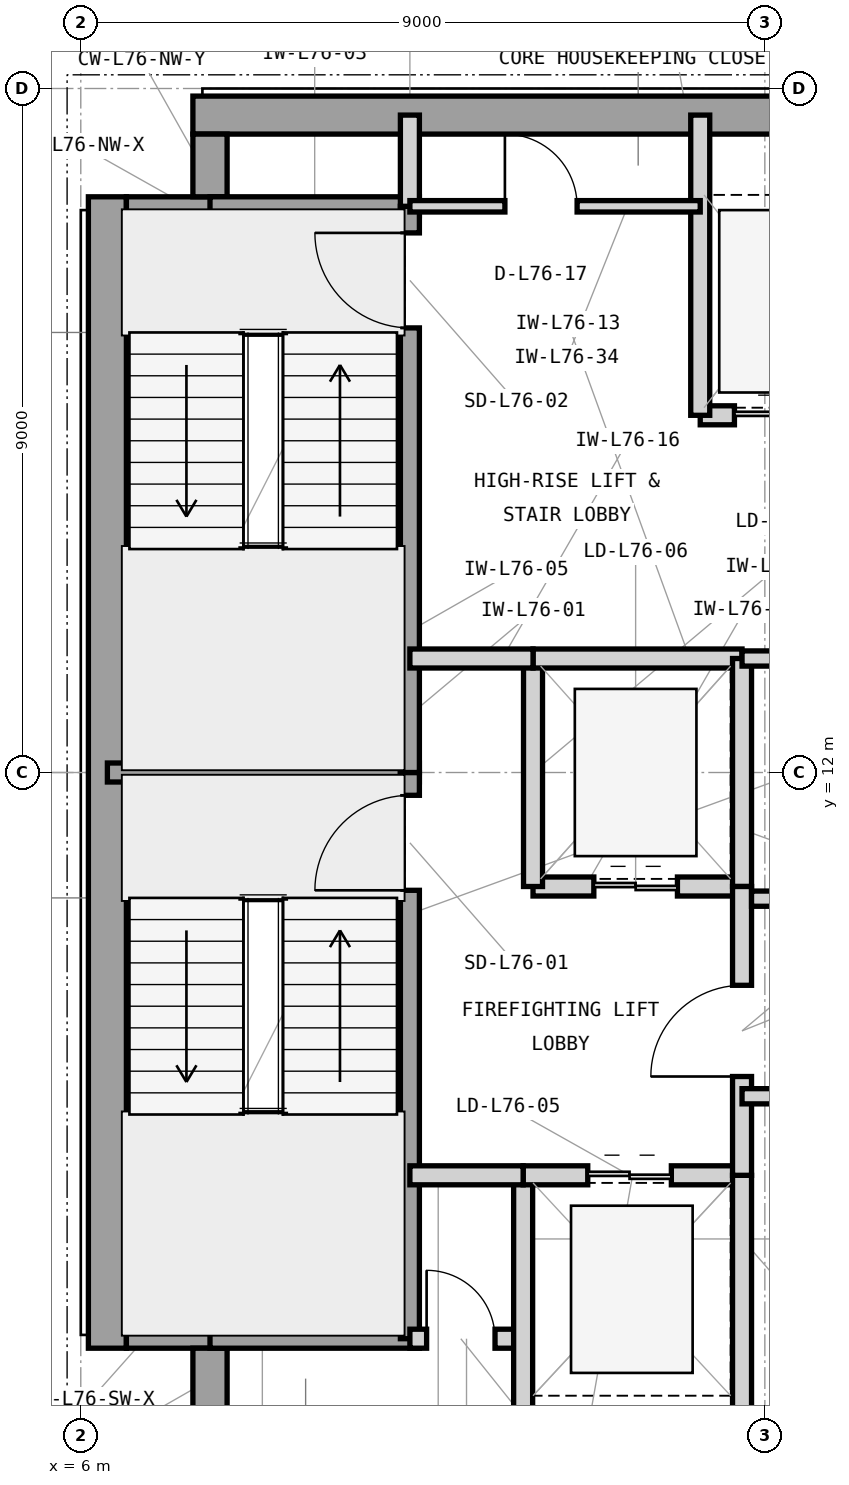
"""IFC4 building model, lengths in metres.
Left out: names, types, materials, properties, quantities, classifications, styles, units other than length and angle.
Written with IfcOpenShell. Run it as: python <this file> out.ifc"""

import sys

from ifc_helpers import new_model, si_unit, direction, frame, frame_2d, origin, place, context, subcontext, project, spatial, rectangle, extrude, element, fill, save


model = new_model("IFC4")
c1 = context("Model", 3, precision=1e-05, world=origin(), true_north=direction((0.0, 1.0)))
c2 = subcontext(c1, "Body", "Model", "MODEL_VIEW")
j1 = project(units=[si_unit("LENGTHUNIT", "METRE"), si_unit("PLANEANGLEUNIT", "RADIAN")], contexts=[c1])
p1 = place(None, origin())
s1 = spatial("IfcSite", under=j1, at=p1, CompositionType="ELEMENT")
p2 = place(p1, origin())
s2 = spatial("IfcBuilding", under=s1, at=p2, CompositionType="ELEMENT")
p3 = place(p2, frame((0.0, 0.0, 309.3)))
s3 = spatial("IfcBuildingStorey", under=s2, at=p3, CompositionType="ELEMENT", Elevation=309.3)
p4 = place(p3, frame((6.35, 4.425, 0.0), z_axis=(0.0, 0.0, 1.0), x_axis=(0.0, 1.0, 0.0)))
e1 = element("IfcWall", 1, at=p4, inside=s3, PredefinedType="SHEAR", context=c2, shape_type="SweptSolid", body=[
    extrude(rectangle(XDim=15.15, YDim=0.5, at=frame_2d((7.575, 0.0))), origin(), (0.0, 0.0, 1.0), 3.9),
])
p5 = place(p3, frame((7.475, 20.65, 0.0), z_axis=(0.0, 0.0, 1.0), x_axis=(1.0, 0.0, 0.0)))
e2 = element("IfcWall", 2, at=p5, inside=s3, PredefinedType="SHEAR", context=c2, shape_type="SweptSolid", body=[
    extrude(rectangle(XDim=12.325, YDim=0.5, at=frame_2d((6.163, 0.0))), origin(), (0.0, 0.0, 1.0), 3.9),
])
p6 = place(p3, frame((6.6, 4.65, 0.0), z_axis=(0.0, 0.0, 1.0), x_axis=(1.0, 0.0, 0.0)))
e3 = element("IfcWall", 3, at=p6, inside=s3, PredefinedType="SHEAR", context=c2, shape_type="SweptSolid", body=[
    extrude(rectangle(XDim=1.325, YDim=0.45, at=frame_2d((0.663, 0.0))), origin(), (0.0, 0.0, 1.0), 3.9),
])
p7 = place(p3, frame((7.7, 3.6, 0.0), z_axis=(0.0, 0.0, 1.0), x_axis=(0.0, 1.0, 0.0)))
e4 = element("IfcWall", 4, at=p7, inside=s3, PredefinedType="SHEAR", context=c2, shape_type="SweptSolid", body=[
    extrude(rectangle(XDim=0.825, YDim=0.45, at=frame_2d((0.413, 0.0))), origin(), (0.0, 0.0, 1.0), 3.9),
])
p8 = place(p3, frame((6.6, 19.35, 0.0), z_axis=(0.0, 0.0, 1.0), x_axis=(1.0, 0.0, 0.0)))
e5 = element("IfcWall", 5, at=p8, inside=s3, PredefinedType="SHEAR", context=c2, shape_type="SweptSolid", body=[
    extrude(rectangle(XDim=1.325, YDim=0.45, at=frame_2d((0.663, 0.0))), origin(), (0.0, 0.0, 1.0), 3.9),
])
p9 = place(p3, frame((7.7, 19.575, 0.0), z_axis=(0.0, 0.0, 1.0), x_axis=(0.0, 1.0, 0.0)))
e6 = element("IfcWall", 6, at=p9, inside=s3, PredefinedType="SHEAR", context=c2, shape_type="SweptSolid", body=[
    extrude(rectangle(XDim=0.825, YDim=0.45, at=frame_2d((0.413, 0.0))), origin(), (0.0, 0.0, 1.0), 3.9),
])
p10 = place(p3, frame((6.35, 12.0, 0.0), z_axis=(0.0, 0.0, 1.0), x_axis=(1.0, 0.0, 0.0)))
e7 = element("IfcWall", 7, at=p10, inside=s3, PredefinedType="SHEAR", context=c2, shape_type="SweptSolid", body=[
    extrude(rectangle(XDim=4.105, YDim=0.25, at=frame_2d((2.052, 0.0))), origin(), (0.0, 0.0, 1.0), 3.9),
])
for number, where, z_axis, x_axis in (
    (8, (7.7, 4.55, 0.0), (0.0, 0.0, 1.0), (1.0, 0.0, 0.0)),
    (9, (7.7, 19.45, 0.0), (0.0, 0.0, 1.0), (1.0, 0.0, 0.0)),
):
    element("IfcWall", number, at=place(p3, frame(where, z_axis=z_axis, x_axis=x_axis)), inside=s3, PredefinedType="SHEAR", context=c2, shape_type="SweptSolid", body=[
        extrude(rectangle(XDim=2.755, YDim=0.25, at=frame_2d((1.377, 0.0))), origin(), (0.0, 0.0, 1.0), 3.9),
    ])
p11 = place(p3, frame((10.33, 4.55, 0.0), z_axis=(0.0, 0.0, 1.0), x_axis=(0.0, 1.0, 0.0)))
e10 = element("IfcWall", 10, at=p11, inside=s3, PredefinedType="SHEAR", context=c2, shape_type="SweptSolid", body=[
    extrude(rectangle(XDim=7.45, YDim=0.25, at=frame_2d((3.725, 0.0))), origin(), (0.0, 0.0, 1.0), 3.9),
])
p12 = place(p11, frame((5.9, 0.0, 0.0)))
e11 = element("IfcOpeningElement", 11, at=p12, cuts=e10, PredefinedType="OPENING", context=c2, shape_type="SweptSolid", body=[
    extrude(rectangle(XDim=1.25, YDim=2.2, at=frame_2d((0.625, 1.1))), frame((0.0, 0.135, 0.0), z_axis=(0.0, -1.0, 0.0), x_axis=(1.0, 0.0, 0.0)), (0.0, 0.0, 1.0), 0.27),
])
p13 = place(p3, frame((10.33, 12.0, 0.0), z_axis=(0.0, 0.0, 1.0), x_axis=(0.0, 1.0, 0.0)))
e12 = element("IfcWall", 12, at=p13, inside=s3, PredefinedType="SHEAR", context=c2, shape_type="SweptSolid", body=[
    extrude(rectangle(XDim=7.45, YDim=0.25, at=frame_2d((3.725, 0.0))), origin(), (0.0, 0.0, 1.0), 3.9),
])
p14 = place(p13, frame((5.85, 0.0, 0.0)))
e13 = element("IfcOpeningElement", 13, at=p14, cuts=e12, PredefinedType="OPENING", context=c2, shape_type="SweptSolid", body=[
    extrude(rectangle(XDim=1.25, YDim=2.2, at=frame_2d((0.625, 1.1))), frame((0.0, 0.135, 0.0), z_axis=(0.0, -1.0, 0.0), x_axis=(1.0, 0.0, 0.0)), (0.0, 0.0, 1.0), 0.27),
])
p15 = place(p3, frame((10.33, 4.55, 0.0), z_axis=(0.0, 0.0, 1.0), x_axis=(1.0, 0.0, 0.0)))
e14 = element("IfcWall", 14, at=p15, inside=s3, PredefinedType="PARTITIONING", context=c2, shape_type="SweptSolid", body=[
    extrude(rectangle(XDim=1.49, YDim=0.25, at=frame_2d((0.745, 0.0))), origin(), (0.0, 0.0, 1.0), 3.61),
])
p16 = place(p15, frame((0.22, 0.0, 0.0)))
e15 = element("IfcOpeningElement", 15, at=p16, cuts=e14, PredefinedType="OPENING", context=c2, shape_type="SweptSolid", body=[
    extrude(rectangle(XDim=0.9, YDim=2.1, at=frame_2d((0.45, 1.05))), frame((0.0, 0.135, 0.0), z_axis=(0.0, -1.0, 0.0), x_axis=(1.0, 0.0, 0.0)), (0.0, 0.0, 1.0), 0.27),
])
p17 = place(p3, frame((11.82, 3.35, 0.0), z_axis=(0.0, 0.0, 1.0), x_axis=(0.0, 1.0, 0.0)))
e16 = element("IfcWall", 16, at=p17, inside=s3, PredefinedType="PARTITIONING", context=c2, shape_type="SweptSolid", body=[
    extrude(rectangle(XDim=3.35, YDim=0.25, at=frame_2d((1.675, 0.0))), origin(), (0.0, 0.0, 1.0), 3.61),
])
p18 = place(p3, frame((10.33, 19.45, 0.0), z_axis=(0.0, 0.0, 1.0), x_axis=(0.0, 1.0, 0.0)))
e17 = element("IfcWall", 17, at=p18, inside=s3, PredefinedType="PARTITIONING", context=c2, shape_type="SweptSolid", body=[
    extrude(rectangle(XDim=1.2, YDim=0.25, at=frame_2d((0.6, 0.0))), origin(), (0.0, 0.0, 1.0), 3.61),
])
p19 = place(p3, frame((11.82, 6.7, 0.0), z_axis=(0.0, 0.0, 1.0), x_axis=(1.0, 0.0, 0.0)))
e18 = element("IfcWall", 18, at=p19, inside=s3, PredefinedType="PARTITIONING", context=c2, shape_type="SweptSolid", body=[
    extrude(rectangle(XDim=2.88, YDim=0.25, at=frame_2d((1.44, 0.0))), origin(), (0.0, 0.0, 1.0), 3.203),
])
p20 = place(p19, frame((0.85, 0.0, 0.0)))
e19 = element("IfcOpeningElement", 19, at=p20, cuts=e18, PredefinedType="OPENING", context=c2, shape_type="SweptSolid", body=[
    extrude(rectangle(XDim=1.1, YDim=2.25, at=frame_2d((0.55, 1.125))), frame((0.0, 0.135, 0.0), z_axis=(0.0, -1.0, 0.0), x_axis=(1.0, 0.0, 0.0)), (0.0, 0.0, 1.0), 0.27),
])
p21 = place(p3, frame((14.7, 3.35, 0.0), z_axis=(0.0, 0.0, 1.0), x_axis=(0.0, 1.0, 0.0)))
e20 = element("IfcWall", 20, at=p21, inside=s3, PredefinedType="PARTITIONING", context=c2, shape_type="SweptSolid", body=[
    extrude(rectangle(XDim=3.35, YDim=0.25, at=frame_2d((1.675, 0.0))), origin(), (0.0, 0.0, 1.0), 3.61),
])
p22 = place(p3, frame((11.95, 10.5, 0.0), z_axis=(0.0, 0.0, 1.0), x_axis=(1.0, 0.0, 0.0)))
e21 = element("IfcWall", 21, at=p22, inside=s3, PredefinedType="PARTITIONING", context=c2, shape_type="SweptSolid", body=[
    extrude(rectangle(XDim=2.75, YDim=0.25, at=frame_2d((1.375, 0.0))), origin(), (0.0, 0.0, 1.0), 3.203),
])
p23 = place(p22, frame((0.8, 0.0, 0.0)))
e22 = element("IfcOpeningElement", 22, at=p23, cuts=e21, PredefinedType="OPENING", context=c2, shape_type="SweptSolid", body=[
    extrude(rectangle(XDim=1.1, YDim=2.25, at=frame_2d((0.55, 1.125))), frame((0.0, 0.135, 0.0), z_axis=(0.0, -1.0, 0.0), x_axis=(1.0, 0.0, 0.0)), (0.0, 0.0, 1.0), 0.27),
])
p24 = place(p3, frame((11.95, 10.5, 0.0), z_axis=(0.0, 0.0, 1.0), x_axis=(0.0, 1.0, 0.0)))
e23 = element("IfcWall", 23, at=p24, inside=s3, PredefinedType="PARTITIONING", context=c2, shape_type="SweptSolid", body=[
    extrude(rectangle(XDim=3.0, YDim=0.25, at=frame_2d((1.5, 0.0))), origin(), (0.0, 0.0, 1.0), 3.61),
])
p25 = place(p3, frame((11.95, 13.5, 0.0), z_axis=(0.0, 0.0, 1.0), x_axis=(1.0, 0.0, 0.0)))
e24 = element("IfcWall", 24, at=p25, inside=s3, PredefinedType="PARTITIONING", context=c2, shape_type="SweptSolid", body=[
    extrude(rectangle(XDim=2.75, YDim=0.25, at=frame_2d((1.375, 0.0))), origin(), (0.0, 0.0, 1.0), 3.203),
])
p26 = place(p3, frame((14.7, 10.5, 0.0), z_axis=(0.0, 0.0, 1.0), x_axis=(0.0, 1.0, 0.0)))
e25 = element("IfcWall", 25, at=p26, inside=s3, PredefinedType="PARTITIONING", context=c2, shape_type="SweptSolid", body=[
    extrude(rectangle(XDim=3.0, YDim=0.25, at=frame_2d((1.5, 0.0))), origin(), (0.0, 0.0, 1.0), 3.61),
])
p27 = place(p3, frame((14.7, 6.7, 0.0), z_axis=(0.0, 0.0, 1.0), x_axis=(0.0, 1.0, 0.0)))
e26 = element("IfcWall", 26, at=p27, inside=s3, PredefinedType="PARTITIONING", context=c2, shape_type="SweptSolid", body=[
    extrude(rectangle(XDim=3.8, YDim=0.25, at=frame_2d((1.9, 0.0))), origin(), (0.0, 0.0, 1.0), 3.61),
])
p28 = place(p27, frame((1.3, 0.0, 0.0)))
e27 = element("IfcOpeningElement", 27, at=p28, cuts=e26, PredefinedType="OPENING", context=c2, shape_type="SweptSolid", body=[
    extrude(rectangle(XDim=1.2, YDim=2.2, at=frame_2d((0.6, 1.1))), frame((0.0, 0.135, 0.0), z_axis=(0.0, -1.0, 0.0), x_axis=(1.0, 0.0, 0.0)), (0.0, 0.0, 1.0), 0.27),
])
p29 = place(p3, frame((10.33, 13.5, 0.0), z_axis=(0.0, 0.0, 1.0), x_axis=(1.0, 0.0, 0.0)))
e28 = element("IfcWall", 28, at=p29, inside=s3, PredefinedType="PARTITIONING", context=c2, shape_type="SweptSolid", body=[
    extrude(rectangle(XDim=1.62, YDim=0.25, at=frame_2d((0.81, 0.0))), origin(), (0.0, 0.0, 1.0), 3.203),
])
p30 = place(p3, frame((10.33, 6.7, 0.0), z_axis=(0.0, 0.0, 1.0), x_axis=(1.0, 0.0, 0.0)))
e29 = element("IfcWall", 29, at=p30, inside=s3, PredefinedType="PARTITIONING", context=c2, shape_type="SweptSolid", body=[
    extrude(rectangle(XDim=1.49, YDim=0.25, at=frame_2d((0.745, 0.0))), origin(), (0.0, 0.0, 1.0), 3.203),
])
p31 = place(p3, frame((14.15, 16.7, 0.0), z_axis=(0.0, 0.0, 1.0), x_axis=(1.0, 0.0, 0.0)))
e30 = element("IfcWall", 30, at=p31, inside=s3, PredefinedType="PARTITIONING", context=c2, shape_type="SweptSolid", body=[
    extrude(rectangle(XDim=2.3, YDim=0.25, at=frame_2d((1.15, 0.0))), origin(), (0.0, 0.0, 1.0), 3.203),
])
p32 = place(p31, frame((0.45, 0.0, 0.0)))
e31 = element("IfcOpeningElement", 31, at=p32, cuts=e30, PredefinedType="OPENING", context=c2, shape_type="SweptSolid", body=[
    extrude(rectangle(XDim=1.4, YDim=2.35, at=frame_2d((0.7, 1.175))), frame((0.0, 0.135, 0.0), z_axis=(0.0, -1.0, 0.0), x_axis=(1.0, 0.0, 0.0)), (0.0, 0.0, 1.0), 0.27),
])
p33 = place(p3, frame((14.15, 16.7, 0.0), z_axis=(0.0, 0.0, 1.0), x_axis=(0.0, 1.0, 0.0)))
e32 = element("IfcWall", 32, at=p33, inside=s3, PredefinedType="PARTITIONING", context=c2, shape_type="SweptSolid", body=[
    extrude(rectangle(XDim=3.95, YDim=0.25, at=frame_2d((1.975, 0.0))), origin(), (0.0, 0.0, 1.0), 3.61),
])
p34 = place(p3, frame((14.7, 7.74, 0.0), z_axis=(0.0, 0.0, 1.0), x_axis=(1.0, 0.0, 0.0)))
e33 = element("IfcWall", 33, at=p34, inside=s3, PredefinedType="PARTITIONING", context=c2, shape_type="SweptSolid", body=[
    extrude(rectangle(XDim=2.8, YDim=0.2, at=frame_2d((1.4, 0.0))), origin(), (0.0, 0.0, 1.0), 3.61),
])
p35 = place(p34, frame((0.9, 0.0, 0.0)))
e34 = element("IfcOpeningElement", 34, at=p35, cuts=e33, PredefinedType="OPENING", context=c2, shape_type="SweptSolid", body=[
    extrude(rectangle(XDim=1.0, YDim=2.15, at=frame_2d((0.5, 1.075))), frame((0.0, 0.11, 0.0), z_axis=(0.0, -1.0, 0.0), x_axis=(1.0, 0.0, 0.0)), (0.0, 0.0, 1.0), 0.22),
])
p36 = place(p3, frame((14.825, 10.34, 0.0), z_axis=(0.0, 0.0, 1.0), x_axis=(1.0, 0.0, 0.0)))
e35 = element("IfcWall", 35, at=p36, inside=s3, PredefinedType="PARTITIONING", context=c2, shape_type="SweptSolid", body=[
    extrude(rectangle(XDim=4.88, YDim=0.2, at=frame_2d((2.44, 0.0))), origin(), (0.0, 0.0, 1.0), 3.61),
])
p37 = place(p3, frame((14.7, 13.5, 0.0), z_axis=(0.0, 0.0, 1.0), x_axis=(1.0, 0.0, 0.0)))
e36 = element("IfcWall", 36, at=p37, inside=s3, PredefinedType="PARTITIONING", context=c2, shape_type="SweptSolid", body=[
    extrude(rectangle(XDim=5.2, YDim=0.2, at=frame_2d((2.6, 0.0))), origin(), (0.0, 0.0, 1.0), 3.203),
])
p38 = place(p37, frame((2.125, 0.0, 0.0)))
e37 = element("IfcOpeningElement", 37, at=p38, cuts=e36, PredefinedType="OPENING", context=c2, shape_type="SweptSolid", body=[
    extrude(rectangle(XDim=0.95, YDim=2.1, at=frame_2d((0.475, 1.05))), frame((0.0, 0.11, 0.0), z_axis=(0.0, -1.0, 0.0), x_axis=(1.0, 0.0, 0.0)), (0.0, 0.0, 1.0), 0.22),
])
p39 = place(p3, frame((10.33, 19.45, 0.0), z_axis=(0.0, 0.0, 1.0), x_axis=(1.0, 0.0, 0.0)))
e38 = element("IfcWall", 38, at=p39, inside=s3, PredefinedType="PARTITIONING", context=c2, shape_type="SweptSolid", body=[
    extrude(rectangle(XDim=3.82, YDim=0.15, at=frame_2d((1.91, 0.0))), origin(), (0.0, 0.0, 1.0), 3.61),
])
p40 = place(p39, frame((1.25, 0.0, 0.0)))
e39 = element("IfcOpeningElement", 39, at=p40, cuts=e38, PredefinedType="OPENING", context=c2, shape_type="SweptSolid", body=[
    extrude(rectangle(XDim=0.95, YDim=2.1, at=frame_2d((0.475, 1.05))), frame((0.0, 0.085, 0.0), z_axis=(0.0, -1.0, 0.0), x_axis=(1.0, 0.0, 0.0)), (0.0, 0.0, 1.0), 0.17),
])
p41 = place(p12, origin())
e40 = element("IfcDoor", 40, at=p41, inside=s3, OperationType="SINGLE_SWING_LEFT", PredefinedType="DOOR", context=c2, shape_type="SweptSolid", body=[
    extrude(rectangle(XDim=1.25, YDim=2.2, at=frame_2d((0.625, 1.1))), frame((0.0, 0.025, 0.0), z_axis=(0.0, -1.0, 0.0), x_axis=(1.0, 0.0, 0.0)), (0.0, 0.0, 1.0), 0.05),
])
fill(e11, e40)
p42 = place(p14, origin())
e41 = element("IfcDoor", 41, at=p42, inside=s3, OperationType="SINGLE_SWING_RIGHT", PredefinedType="DOOR", context=c2, shape_type="SweptSolid", body=[
    extrude(rectangle(XDim=1.25, YDim=2.2, at=frame_2d((0.625, 1.1))), frame((0.0, 0.025, 0.0), z_axis=(0.0, -1.0, 0.0), x_axis=(1.0, 0.0, 0.0)), (0.0, 0.0, 1.0), 0.05),
])
fill(e13, e41)
p43 = place(p16, origin())
e42 = element("IfcDoor", 42, at=p43, inside=s3, OperationType="SINGLE_SWING_LEFT", PredefinedType="TRAPDOOR", context=c2, shape_type="SweptSolid", body=[
    extrude(rectangle(XDim=0.9, YDim=2.1, at=frame_2d((0.45, 1.05))), frame((0.0, 0.025, 0.0), z_axis=(0.0, -1.0, 0.0), x_axis=(1.0, 0.0, 0.0)), (0.0, 0.0, 1.0), 0.05),
])
fill(e15, e42)
p44 = place(p20, origin())
e43 = element("IfcDoor", 43, at=p44, inside=s3, OperationType="DOUBLE_DOOR_SLIDING", PredefinedType="DOOR", context=c2, shape_type="SweptSolid", body=[
    extrude(rectangle(XDim=1.1, YDim=2.25, at=frame_2d((0.55, 1.125))), frame((0.0, 0.025, 0.0), z_axis=(0.0, -1.0, 0.0), x_axis=(1.0, 0.0, 0.0)), (0.0, 0.0, 1.0), 0.05),
])
fill(e19, e43)
p45 = place(p23, origin())
e44 = element("IfcDoor", 44, at=p45, inside=s3, OperationType="DOUBLE_DOOR_SLIDING", PredefinedType="DOOR", context=c2, shape_type="SweptSolid", body=[
    extrude(rectangle(XDim=1.1, YDim=2.25, at=frame_2d((0.55, 1.125))), frame((0.0, 0.025, 0.0), z_axis=(0.0, -1.0, 0.0), x_axis=(1.0, 0.0, 0.0)), (0.0, 0.0, 1.0), 0.05),
])
fill(e22, e44)
p46 = place(p28, origin())
e45 = element("IfcDoor", 45, at=p46, inside=s3, OperationType="SINGLE_SWING_LEFT", PredefinedType="DOOR", context=c2, shape_type="SweptSolid", body=[
    extrude(rectangle(XDim=1.2, YDim=2.2, at=frame_2d((0.6, 1.1))), frame((0.0, 0.025, 0.0), z_axis=(0.0, -1.0, 0.0), x_axis=(1.0, 0.0, 0.0)), (0.0, 0.0, 1.0), 0.05),
])
fill(e27, e45)
p47 = place(p32, origin())
e46 = element("IfcDoor", 46, at=p47, inside=s3, OperationType="DOUBLE_DOOR_SLIDING", PredefinedType="DOOR", context=c2, shape_type="SweptSolid", body=[
    extrude(rectangle(XDim=1.4, YDim=2.35, at=frame_2d((0.7, 1.175))), frame((0.0, 0.025, 0.0), z_axis=(0.0, -1.0, 0.0), x_axis=(1.0, 0.0, 0.0)), (0.0, 0.0, 1.0), 0.05),
])
fill(e31, e46)
p48 = place(p40, origin())
e47 = element("IfcDoor", 47, at=p48, inside=s3, OperationType="SINGLE_SWING_LEFT", PredefinedType="DOOR", context=c2, shape_type="SweptSolid", body=[
    extrude(rectangle(XDim=0.95, YDim=2.1, at=frame_2d((0.475, 1.05))), frame((0.0, 0.025, 0.0), z_axis=(0.0, -1.0, 0.0), x_axis=(1.0, 0.0, 0.0)), (0.0, 0.0, 1.0), 0.05),
])
fill(e39, e47)
save(model, sys.argv[1])
